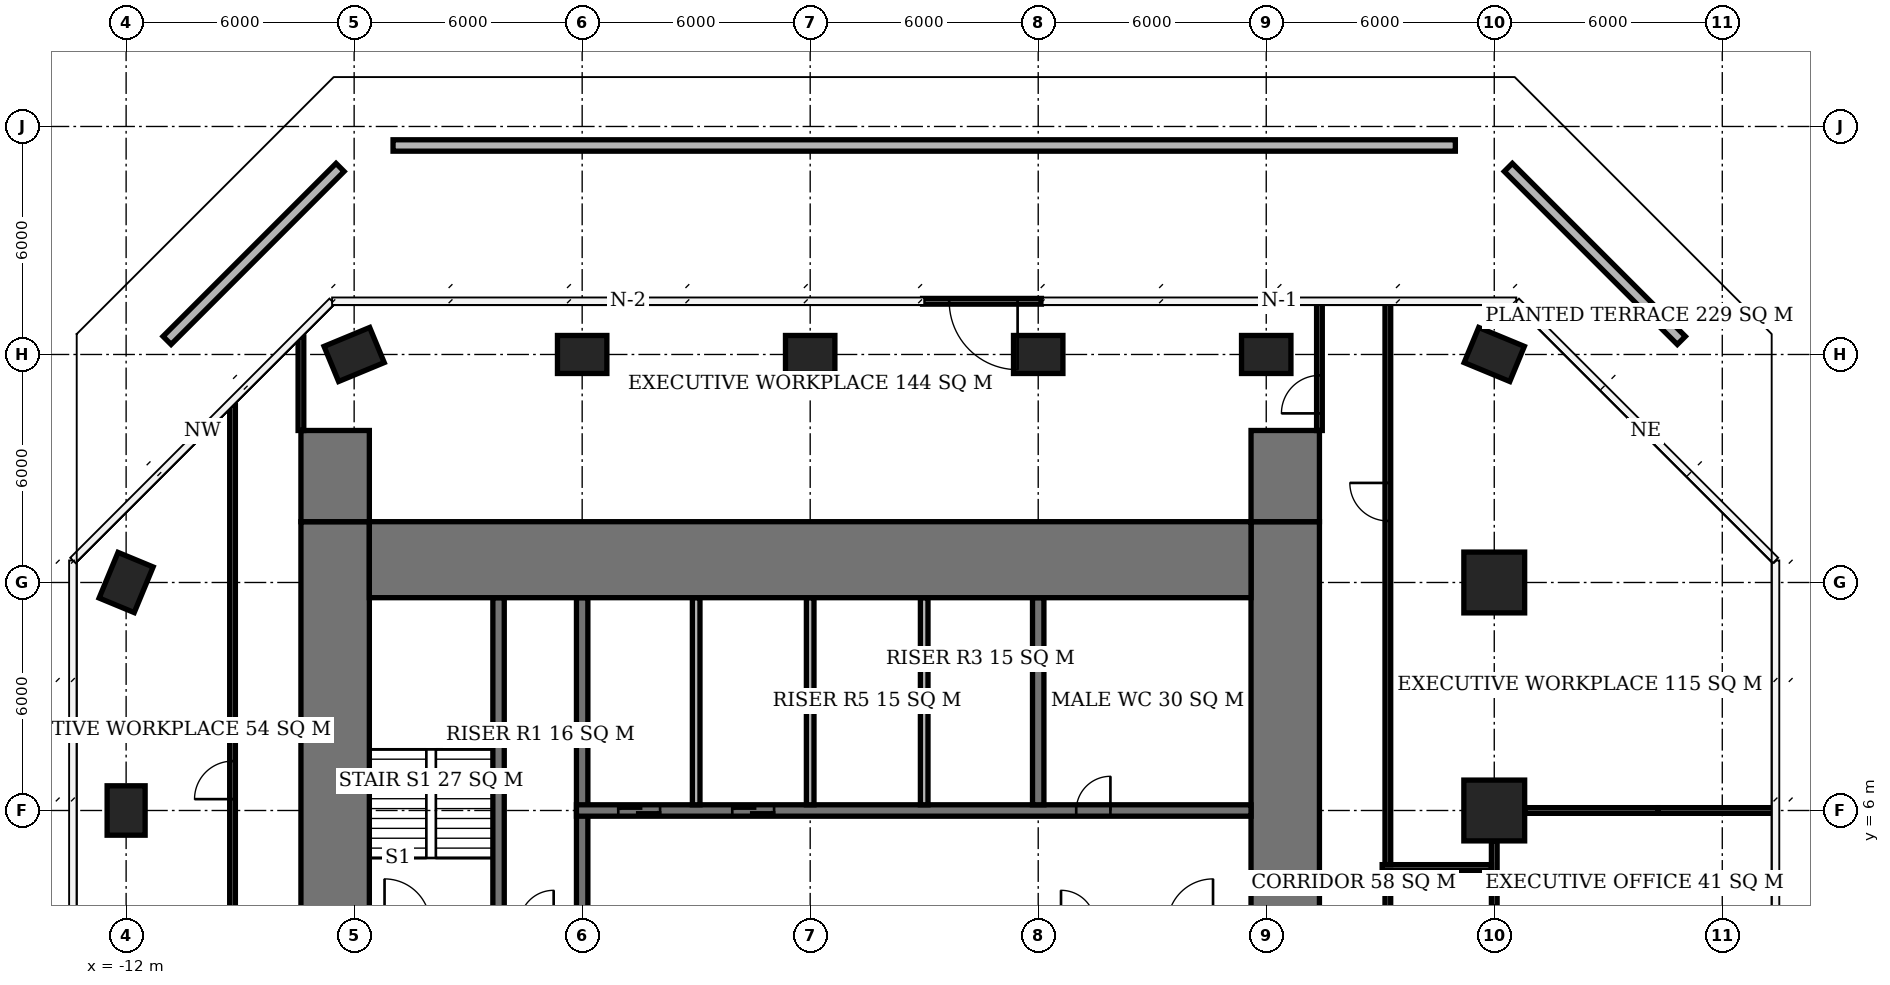
"""IFC4 building model, lengths in metres.
Left out: names, types, materials, properties, quantities, classifications, styles, units other than length and angle.
Written with IfcOpenShell. Run it as: python <this file> out.ifc"""

import sys

from ifc_helpers import new_model, si_unit, direction, frame, frame_2d, origin, origin_2d, place, context, subcontext, project, spatial, rectangle, extrude, element, fill, save


model = new_model("IFC4")
c1 = context("Model", 3, precision=1e-05, world=origin(), true_north=direction((0.0, 1.0)))
c2 = subcontext(c1, "Body", "Model", "MODEL_VIEW")
j1 = project(units=[si_unit("LENGTHUNIT", "METRE"), si_unit("PLANEANGLEUNIT", "RADIAN")], contexts=[c1])
p1 = place(None, origin())
s1 = spatial("IfcSite", under=j1, at=p1, CompositionType="ELEMENT")
p2 = place(p1, origin())
s2 = spatial("IfcBuilding", under=s1, at=p2, CompositionType="ELEMENT")
p3 = place(p2, frame((0.0, 0.0, 268.4)))
s3 = spatial("IfcBuildingStorey", under=s2, at=p3, CompositionType="ELEMENT", Elevation=268.4)
for number, where, z_axis, x_axis in (
    (1, (-12.0, 6.0, 0.0), (0.0, 0.0, 1.0), (0.0, 1.0, 0.0)),
    (2, (-12.0, 12.0, 0.0), (0.0, 0.0, 1.0), (0.383, 0.924, 0.0)),
    (3, (-6.0, 18.0, 0.0), (0.0, 0.0, 1.0), (0.924, 0.383, 0.0)),
    (4, (0.0, 18.0, 0.0), (0.0, 0.0, 1.0), (1.0, 0.0, 0.0)),
    (5, (6.0, 18.0, 0.0), (0.0, 0.0, 1.0), (1.0, 0.0, 0.0)),
    (6, (12.0, 18.0, 0.0), (0.0, 0.0, 1.0), (1.0, 0.0, 0.0)),
    (7, (18.0, 18.0, 0.0), (0.0, 0.0, 1.0), (1.0, 0.0, 0.0)),
):
    element("IfcColumn", number, at=place(p3, frame(where, z_axis=z_axis, x_axis=x_axis)), inside=s3, PredefinedType="COLUMN", context=c2, shape_type="SweptSolid", body=[
        extrude(rectangle(XDim=1.3, YDim=1.0, at=origin_2d()), origin(), (0.0, 0.0, 1.0), 3.9),
    ])
for number, where, z_axis, x_axis in (
    (8, (24.0, 6.0, 0.0), (0.0, 0.0, 1.0), (1.0, 0.0, 0.0)),
    (9, (24.0, 12.0, 0.0), (0.0, 0.0, 1.0), (1.0, 0.0, 0.0)),
):
    element("IfcColumn", number, at=place(p3, frame(where, z_axis=z_axis, x_axis=x_axis)), inside=s3, PredefinedType="COLUMN", context=c2, shape_type="SweptSolid", body=[
        extrude(rectangle(XDim=1.6, YDim=1.6, at=origin_2d()), origin(), (0.0, 0.0, 1.0), 3.9),
    ])
p4 = place(p3, frame((24.0, 18.0, 0.0), z_axis=(0.0, 0.0, 1.0), x_axis=(0.923879532511, -0.382683432365, 0.0)))
e10 = element("IfcColumn", 10, at=p4, inside=s3, PredefinedType="COLUMN", context=c2, shape_type="SweptSolid", body=[
    extrude(rectangle(XDim=1.3, YDim=1.0, at=origin_2d()), origin(), (0.0, 0.0, 1.0), 3.9),
])
p5 = place(p3, frame((-5.6, 12.6, 0.0), z_axis=(0.0, 0.0, 1.0), x_axis=(1.0, 0.0, 0.0)))
e11 = element("IfcWall", 11, at=p5, inside=s3, PredefinedType="SHEAR", context=c2, shape_type="SweptSolid", body=[
    extrude(rectangle(XDim=23.2, YDim=2.0, at=frame_2d((11.6, 0.0))), origin(), (0.0, 0.0, 1.0), 3.9),
])
p6 = place(p3, frame((-6.5, -7.6, 0.0), z_axis=(0.0, 0.0, 1.0), x_axis=(0.0, 1.0, 0.0)))
e12 = element("IfcWall", 12, at=p6, inside=s3, PredefinedType="SHEAR", context=c2, shape_type="SweptSolid", body=[
    extrude(rectangle(XDim=21.2, YDim=1.8, at=frame_2d((10.6, 0.0))), origin(), (0.0, 0.0, 1.0), 3.9),
])
p7 = place(p6, frame((7.8, 0.0, 0.0)))
e13 = element("IfcOpeningElement", 13, at=p7, cuts=e12, PredefinedType="OPENING", context=c2, shape_type="SweptSolid", body=[
    extrude(rectangle(XDim=1.8, YDim=2.4, at=frame_2d((0.9, 1.2))), frame((0.0, 0.91, 0.0), z_axis=(0.0, -1.0, 0.0), x_axis=(1.0, 0.0, 0.0)), (0.0, 0.0, 1.0), 1.82),
])
p8 = place(p3, frame((18.5, -7.6, 0.0), z_axis=(0.0, 0.0, 1.0), x_axis=(0.0, 1.0, 0.0)))
e14 = element("IfcWall", 14, at=p8, inside=s3, PredefinedType="SHEAR", context=c2, shape_type="SweptSolid", body=[
    extrude(rectangle(XDim=21.2, YDim=1.8, at=frame_2d((10.6, 0.0))), origin(), (0.0, 0.0, 1.0), 3.9),
])
p9 = place(p8, frame((9.2, 0.0, 0.0)))
e15 = element("IfcOpeningElement", 15, at=p9, cuts=e14, PredefinedType="OPENING", context=c2, shape_type="SweptSolid", body=[
    extrude(rectangle(XDim=1.8, YDim=2.4, at=frame_2d((0.9, 1.2))), frame((0.0, 0.91, 0.0), z_axis=(0.0, -1.0, 0.0), x_axis=(1.0, 0.0, 0.0)), (0.0, 0.0, 1.0), 1.82),
])
for number, where, z_axis, x_axis in (
    (16, (-6.5, 13.6, 0.0), (0.0, 0.0, 1.0), (0.0, 1.0, 0.0)),
    (17, (18.5, 13.6, 0.0), (0.0, 0.0, 1.0), (0.0, 1.0, 0.0)),
):
    element("IfcWall", number, at=place(p3, frame(where, z_axis=z_axis, x_axis=x_axis)), inside=s3, PredefinedType="SHEAR", context=c2, shape_type="SweptSolid", body=[
        extrude(rectangle(XDim=2.4, YDim=1.8, at=frame_2d((1.2, 0.0))), origin(), (0.0, 0.0, 1.0), 3.9),
    ])
p10 = place(p3, frame((-0.15, 6.0, 0.0), z_axis=(0.0, 0.0, 1.0), x_axis=(1.0, 0.0, 0.0)))
e18 = element("IfcWall", 18, at=p10, inside=s3, PredefinedType="SHEAR", context=c2, shape_type="SweptSolid", body=[
    extrude(rectangle(XDim=17.75, YDim=0.3, at=frame_2d((8.875, 0.0))), origin(), (0.0, 0.0, 1.0), 3.9),
])
p11 = place(p10, frame((13.15, 0.0, 0.0)))
e19 = element("IfcOpeningElement", 19, at=p11, cuts=e18, PredefinedType="OPENING", context=c2, shape_type="SweptSolid", body=[
    extrude(rectangle(XDim=0.9, YDim=2.1, at=frame_2d((0.45, 1.05))), frame((0.0, 0.16, 0.0), z_axis=(0.0, -1.0, 0.0), x_axis=(1.0, 0.0, 0.0)), (0.0, 0.0, 1.0), 0.32),
])
p12 = place(p10, frame((1.1, 0.0, 0.0)))
e20 = element("IfcOpeningElement", 20, at=p12, cuts=e18, PredefinedType="OPENING", context=c2, shape_type="SweptSolid", body=[
    extrude(rectangle(XDim=1.1, YDim=2.1, at=frame_2d((0.55, 1.05))), frame((0.0, 0.16, 0.0), z_axis=(0.0, -1.0, 0.0), x_axis=(1.0, 0.0, 0.0)), (0.0, 0.0, 1.0), 0.32),
])
p13 = place(p10, frame((4.1, 0.0, 0.0)))
e21 = element("IfcOpeningElement", 21, at=p13, cuts=e18, PredefinedType="OPENING", context=c2, shape_type="SweptSolid", body=[
    extrude(rectangle(XDim=1.1, YDim=2.1, at=frame_2d((0.55, 1.05))), frame((0.0, 0.16, 0.0), z_axis=(0.0, -1.0, 0.0), x_axis=(1.0, 0.0, 0.0)), (0.0, 0.0, 1.0), 0.32),
])
p14 = place(p3, frame((0.0, 3.15, 0.0), z_axis=(0.0, 0.0, 1.0), x_axis=(0.0, 1.0, 0.0)))
e22 = element("IfcWall", 22, at=p14, inside=s3, PredefinedType="SHEAR", context=c2, shape_type="SweptSolid", body=[
    extrude(rectangle(XDim=8.45, YDim=0.3, at=frame_2d((4.225, 0.0))), origin(), (0.0, 0.0, 1.0), 3.9),
])
p15 = place(p3, frame((12.0, 6.15, 0.0), z_axis=(0.0, 0.0, 1.0), x_axis=(0.0, 1.0, 0.0)))
e23 = element("IfcWall", 23, at=p15, inside=s3, PredefinedType="SHEAR", context=c2, shape_type="SweptSolid", body=[
    extrude(rectangle(XDim=5.45, YDim=0.3, at=frame_2d((2.725, 0.0))), origin(), (0.0, 0.0, 1.0), 3.9),
])
p16 = place(p3, frame((-2.2, 3.15, 0.0), z_axis=(0.0, 0.0, 1.0), x_axis=(0.0, 1.0, 0.0)))
e24 = element("IfcWall", 24, at=p16, inside=s3, PredefinedType="SHEAR", context=c2, shape_type="SweptSolid", body=[
    extrude(rectangle(XDim=8.45, YDim=0.3, at=frame_2d((4.225, 0.0))), origin(), (0.0, 0.0, 1.0), 3.9),
])
for number, where, z_axis, x_axis in (
    (25, (3.0, 6.15, 0.0), (0.0, 0.0, 1.0), (0.0, 1.0, 0.0)),
    (26, (6.0, 6.15, 0.0), (0.0, 0.0, 1.0), (0.0, 1.0, 0.0)),
    (27, (9.0, 6.15, 0.0), (0.0, 0.0, 1.0), (0.0, 1.0, 0.0)),
):
    element("IfcWall", number, at=place(p3, frame(where, z_axis=z_axis, x_axis=x_axis)), inside=s3, PredefinedType="SOLIDWALL", context=c2, shape_type="SweptSolid", body=[
        extrude(rectangle(XDim=5.45, YDim=0.2, at=frame_2d((2.725, 0.0))), origin(), (0.0, 0.0, 1.0), 3.9),
    ])
p17 = place(p3, frame((12.083, 19.4, 0.0), z_axis=(0.0, 0.0, 1.0), x_axis=(-1.0, 0.0, 0.0)))
e28 = element("IfcWall", 28, at=p17, inside=s3, PredefinedType="USERDEFINED", context=c2, shape_type="SweptSolid", body=[
    extrude(rectangle(XDim=3.126, YDim=0.15, at=frame_2d((1.563, 0.0))), origin(), (0.0, 0.0, 1.0), 3.9),
])
p18 = place(p17, frame((0.625, 0.0, 0.0)))
e29 = element("IfcOpeningElement", 29, at=p18, cuts=e28, PredefinedType="OPENING", context=c2, shape_type="SweptSolid", body=[
    extrude(rectangle(XDim=1.8, YDim=2.4, at=frame_2d((0.9, 1.2))), frame((0.0, 0.085, 0.0), z_axis=(0.0, -1.0, 0.0), x_axis=(1.0, 0.0, 0.0)), (0.0, 0.0, 1.0), 0.17),
])
p19 = place(p3, frame((-10.923, 18.37, 0.0), z_axis=(0.0, 0.0, 1.0), x_axis=(0.707106781187, 0.707106781187, 0.0)))
e30 = element("IfcWall", 30, at=p19, inside=s3, PredefinedType="USERDEFINED", context=c2, shape_type="SweptSolid", body=[
    extrude(rectangle(XDim=6.438, YDim=0.3, at=frame_2d((3.219, 0.0))), origin(), (0.0, 0.0, 1.0), 0.6),
])
p20 = place(p3, frame((-4.976, 23.5, 0.0), z_axis=(0.0, 0.0, 1.0), x_axis=(1.0, 0.0, 0.0)))
e31 = element("IfcWall", 31, at=p20, inside=s3, PredefinedType="USERDEFINED", context=c2, shape_type="SweptSolid", body=[
    extrude(rectangle(XDim=27.953, YDim=0.3, at=frame_2d((13.976, 0.0))), origin(), (0.0, 0.0, 1.0), 0.6),
])
p21 = place(p3, frame((24.37, 22.923, 0.0), z_axis=(0.0, 0.0, 1.0), x_axis=(0.707106781187, -0.707106781187, 0.0)))
e32 = element("IfcWall", 32, at=p21, inside=s3, PredefinedType="USERDEFINED", context=c2, shape_type="SweptSolid", body=[
    extrude(rectangle(XDim=6.438, YDim=0.3, at=frame_2d((3.219, 0.0))), origin(), (0.0, 0.0, 1.0), 0.6),
])
p22 = place(p3, frame((24.8, 6.0, 0.0), z_axis=(0.0, 0.0, 1.0), x_axis=(1.0, 0.0, 0.0)))
e33 = element("IfcWall", 33, at=p22, inside=s3, PredefinedType="PARTITIONING", context=c2, shape_type="SweptSolid", body=[
    extrude(rectangle(XDim=3.51, YDim=0.15, at=frame_2d((1.755, 0.0))), origin(), (0.0, 0.0, 1.0), 2.65),
])
p23 = place(p3, frame((28.31, 6.0, 0.0), z_axis=(0.0, 0.0, 1.0), x_axis=(1.0, 0.0, 0.0)))
e34 = element("IfcWall", 34, at=p23, inside=s3, PredefinedType="PARTITIONING", context=c2, shape_type="SweptSolid", body=[
    extrude(rectangle(XDim=3.065, YDim=0.15, at=frame_2d((1.532, 0.0))), origin(), (0.0, 0.0, 1.0), 3.65),
])
p24 = place(p3, frame((24.0, 0.8, 0.0), z_axis=(0.0, 0.0, 1.0), x_axis=(0.0, 1.0, 0.0)))
e35 = element("IfcWall", 35, at=p24, inside=s3, PredefinedType="PARTITIONING", context=c2, shape_type="SweptSolid", body=[
    extrude(rectangle(XDim=4.4, YDim=0.15, at=frame_2d((2.2, 0.0))), origin(), (0.0, 0.0, 1.0), 3.65),
])
p25 = place(p24, frame((1.7, 0.0, 0.0)))
e36 = element("IfcOpeningElement", 36, at=p25, cuts=e35, PredefinedType="OPENING", context=c2, shape_type="SweptSolid", body=[
    extrude(rectangle(XDim=1.0, YDim=2.4, at=frame_2d((0.5, 1.2))), frame((0.0, 0.085, 0.0), z_axis=(0.0, -1.0, 0.0), x_axis=(1.0, 0.0, 0.0)), (0.0, 0.0, 1.0), 0.17),
])
p26 = place(p3, frame((-9.2, 1.575, 0.0), z_axis=(0.0, 0.0, 1.0), x_axis=(0.0, 1.0, 0.0)))
e37 = element("IfcWall", 37, at=p26, inside=s3, PredefinedType="PARTITIONING", context=c2, shape_type="SweptSolid", body=[
    extrude(rectangle(XDim=15.089, YDim=0.15, at=frame_2d((7.544, 0.0))), origin(), (0.0, 0.0, 1.0), 3.65),
])
p27 = place(p26, frame((4.724, 0.0, 0.0)))
e38 = element("IfcOpeningElement", 38, at=p27, cuts=e37, PredefinedType="OPENING", context=c2, shape_type="SweptSolid", body=[
    extrude(rectangle(XDim=1.0, YDim=2.4, at=frame_2d((0.5, 1.2))), frame((0.0, 0.085, 0.0), z_axis=(0.0, -1.0, 0.0), x_axis=(1.0, 0.0, 0.0)), (0.0, 0.0, 1.0), 0.17),
])
p28 = place(p3, frame((-7.4, 16.0, 0.0), z_axis=(0.0, 0.0, 1.0), x_axis=(0.0, 1.0, 0.0)))
e39 = element("IfcWall", 39, at=p28, inside=s3, PredefinedType="PARTITIONING", context=c2, shape_type="SweptSolid", body=[
    extrude(rectangle(XDim=2.464, YDim=0.15, at=frame_2d((1.232, 0.0))), origin(), (0.0, 0.0, 1.0), 3.65),
])
p29 = place(p3, frame((19.4, 16.0, 0.0), z_axis=(0.0, 0.0, 1.0), x_axis=(0.0, 1.0, 0.0)))
e40 = element("IfcWall", 40, at=p29, inside=s3, PredefinedType="PARTITIONING", context=c2, shape_type="SweptSolid", body=[
    extrude(rectangle(XDim=3.375, YDim=0.15, at=frame_2d((1.688, 0.0))), origin(), (0.0, 0.0, 1.0), 3.65),
])
p30 = place(p29, frame((0.45, 0.0, 0.0)))
e41 = element("IfcOpeningElement", 41, at=p30, cuts=e40, PredefinedType="OPENING", context=c2, shape_type="SweptSolid", body=[
    extrude(rectangle(XDim=1.0, YDim=2.1, at=frame_2d((0.5, 1.05))), frame((0.0, 0.085, 0.0), z_axis=(0.0, -1.0, 0.0), x_axis=(1.0, 0.0, 0.0)), (0.0, 0.0, 1.0), 0.17),
])
p31 = place(p3, frame((21.2, -10.425, 0.0), z_axis=(0.0, 0.0, 1.0), x_axis=(0.0, 1.0, 0.0)))
e42 = element("IfcWall", 42, at=p31, inside=s3, PredefinedType="PARTITIONING", context=c2, shape_type="SweptSolid", body=[
    extrude(rectangle(XDim=14.85, YDim=0.15, at=frame_2d((7.425, 0.0))), origin(), (0.0, 0.0, 1.0), 3.65),
])
p32 = place(p31, frame((9.175, 0.0, 0.0)))
e43 = element("IfcOpeningElement", 43, at=p32, cuts=e42, PredefinedType="OPENING", context=c2, shape_type="SweptSolid", body=[
    extrude(rectangle(XDim=1.0, YDim=2.4, at=frame_2d((0.5, 1.2))), frame((0.0, 0.085, 0.0), z_axis=(0.0, -1.0, 0.0), x_axis=(1.0, 0.0, 0.0)), (0.0, 0.0, 1.0), 0.17),
])
p33 = place(p3, frame((21.2, 4.575, 0.0), z_axis=(0.0, 0.0, 1.0), x_axis=(0.0, 1.0, 0.0)))
e44 = element("IfcWall", 44, at=p33, inside=s3, PredefinedType="PARTITIONING", context=c2, shape_type="SweptSolid", body=[
    extrude(rectangle(XDim=14.8, YDim=0.15, at=frame_2d((7.4, 0.0))), origin(), (0.0, 0.0, 1.0), 3.65),
])
p34 = place(p33, frame((9.045, 0.0, 0.0)))
e45 = element("IfcOpeningElement", 45, at=p34, cuts=e44, PredefinedType="OPENING", context=c2, shape_type="SweptSolid", body=[
    extrude(rectangle(XDim=1.0, YDim=2.4, at=frame_2d((0.5, 1.2))), frame((0.0, 0.085, 0.0), z_axis=(0.0, -1.0, 0.0), x_axis=(1.0, 0.0, 0.0)), (0.0, 0.0, 1.0), 0.17),
])
p35 = place(p3, frame((21.05, 4.5, 0.0), z_axis=(0.0, 0.0, 1.0), x_axis=(1.0, 0.0, 0.0)))
e46 = element("IfcWall", 46, at=p35, inside=s3, PredefinedType="PARTITIONING", context=c2, shape_type="SweptSolid", body=[
    extrude(rectangle(XDim=2.875, YDim=0.15, at=frame_2d((1.438, 0.0))), origin(), (0.0, 0.0, 1.0), 3.65),
])
p36 = place(p18, origin())
e47 = element("IfcDoor", 47, at=p36, inside=s3, OperationType="DOUBLE_DOOR_SINGLE_SWING", PredefinedType="DOOR", context=c2, shape_type="SweptSolid", body=[
    extrude(rectangle(XDim=1.8, YDim=2.4, at=frame_2d((0.9, 1.2))), frame((0.0, 0.025, 0.0), z_axis=(0.0, -1.0, 0.0), x_axis=(1.0, 0.0, 0.0)), (0.0, 0.0, 1.0), 0.05),
])
fill(e29, e47)
p37 = place(p11, origin())
e48 = element("IfcDoor", 48, at=p37, inside=s3, OperationType="SINGLE_SWING_RIGHT", PredefinedType="DOOR", context=c2, shape_type="SweptSolid", body=[
    extrude(rectangle(XDim=0.9, YDim=2.1, at=frame_2d((0.45, 1.05))), frame((0.0, 0.025, 0.0), z_axis=(0.0, -1.0, 0.0), x_axis=(1.0, 0.0, 0.0)), (0.0, 0.0, 1.0), 0.05),
])
fill(e19, e48)
p38 = place(p12, origin())
e49 = element("IfcDoor", 49, at=p38, inside=s3, OperationType="DOUBLE_DOOR_SLIDING", PredefinedType="USERDEFINED", context=c2, shape_type="SweptSolid", body=[
    extrude(rectangle(XDim=1.1, YDim=2.1, at=frame_2d((0.55, 1.05))), frame((0.0, 0.025, 0.0), z_axis=(0.0, -1.0, 0.0), x_axis=(1.0, 0.0, 0.0)), (0.0, 0.0, 1.0), 0.05),
])
fill(e20, e49)
p39 = place(p13, origin())
e50 = element("IfcDoor", 50, at=p39, inside=s3, OperationType="DOUBLE_DOOR_SLIDING", PredefinedType="USERDEFINED", context=c2, shape_type="SweptSolid", body=[
    extrude(rectangle(XDim=1.1, YDim=2.1, at=frame_2d((0.55, 1.05))), frame((0.0, 0.025, 0.0), z_axis=(0.0, -1.0, 0.0), x_axis=(1.0, 0.0, 0.0)), (0.0, 0.0, 1.0), 0.05),
])
fill(e21, e50)
p40 = place(p27, origin())
e51 = element("IfcDoor", 51, at=p40, inside=s3, OperationType="SINGLE_SWING_LEFT", PredefinedType="DOOR", context=c2, shape_type="SweptSolid", body=[
    extrude(rectangle(XDim=1.0, YDim=2.4, at=frame_2d((0.5, 1.2))), frame((0.0, 0.025, 0.0), z_axis=(0.0, -1.0, 0.0), x_axis=(1.0, 0.0, 0.0)), (0.0, 0.0, 1.0), 0.05),
])
fill(e38, e51)
p41 = place(p34, origin())
e52 = element("IfcDoor", 52, at=p41, inside=s3, OperationType="SINGLE_SWING_RIGHT", PredefinedType="DOOR", context=c2, shape_type="SweptSolid", body=[
    extrude(rectangle(XDim=1.0, YDim=2.4, at=frame_2d((0.5, 1.2))), frame((0.0, 0.025, 0.0), z_axis=(0.0, -1.0, 0.0), x_axis=(1.0, 0.0, 0.0)), (0.0, 0.0, 1.0), 0.05),
])
fill(e45, e52)
p42 = place(p30, origin())
e53 = element("IfcDoor", 53, at=p42, inside=s3, OperationType="SINGLE_SWING_LEFT", PredefinedType="DOOR", context=c2, shape_type="SweptSolid", body=[
    extrude(rectangle(XDim=1.0, YDim=2.1, at=frame_2d((0.5, 1.05))), frame((0.0, 0.025, 0.0), z_axis=(0.0, -1.0, 0.0), x_axis=(1.0, 0.0, 0.0)), (0.0, 0.0, 1.0), 0.05),
])
fill(e41, e53)
save(model, sys.argv[1])
